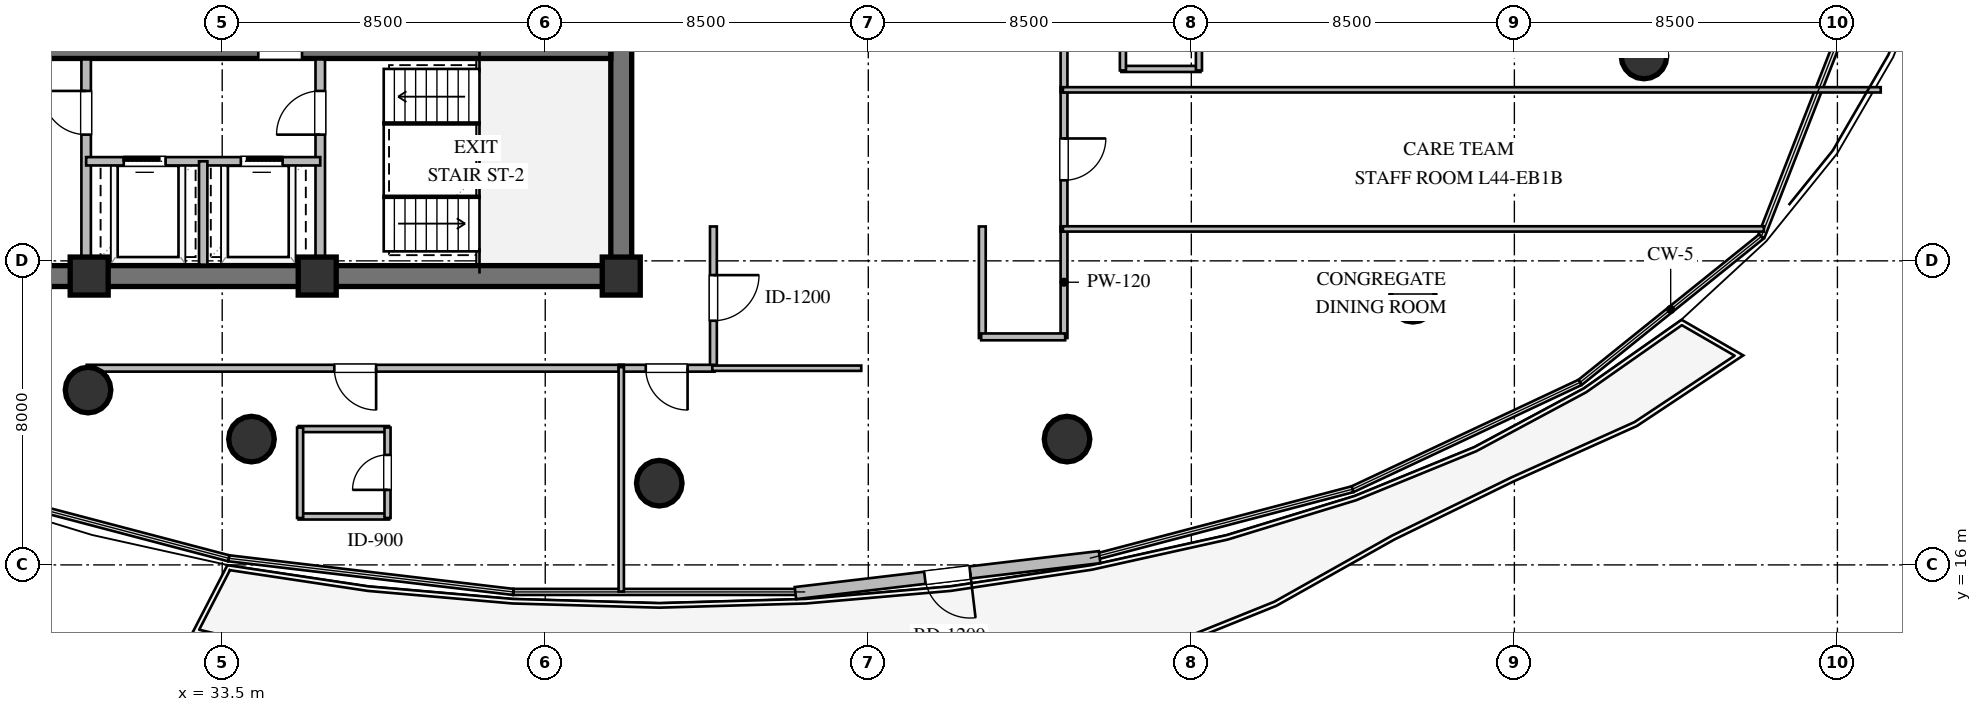
"""IFC4 building model, lengths in metres.
Left out: names, types, materials, properties, quantities, classifications, styles, units other than length and angle.
Written with IfcOpenShell. Run it as: python <this file> out.ifc"""

import sys

from ifc_helpers import new_model, si_unit, direction, frame, frame_2d, origin, origin_2d, place, context, subcontext, project, spatial, rectangle, circle, extrude, element, fill, save


model = new_model("IFC4")
c1 = context("Model", 3, precision=1e-05, world=origin(), true_north=direction((0.0, 1.0)))
c2 = subcontext(c1, "Body", "Model", "MODEL_VIEW")
j1 = project(units=[si_unit("LENGTHUNIT", "METRE"), si_unit("PLANEANGLEUNIT", "RADIAN")], contexts=[c1])
p1 = place(None, origin())
s1 = spatial("IfcSite", under=j1, at=p1, CompositionType="ELEMENT")
p2 = place(p1, origin())
s2 = spatial("IfcBuilding", under=s1, at=p2, CompositionType="ELEMENT")
p3 = place(p2, frame((0.0, 0.0, 167.4)))
s3 = spatial("IfcBuildingStorey", under=s2, at=p3, CompositionType="ELEMENT", Elevation=167.4)
p4 = place(p3, frame((21.725, 23.6, 0.0), z_axis=(0.0, 0.0, 1.0), x_axis=(1.0, 0.0, 0.0)))
e1 = element("IfcWall", 1, at=p4, inside=s3, PredefinedType="SHEAR", context=c2, shape_type="SweptSolid", body=[
    extrude(rectangle(XDim=22.55, YDim=0.55, at=frame_2d((11.275, 0.0))), origin(), (0.0, 0.0, 1.0), 3.36),
])
p5 = place(p3, frame((44.0, 23.875, 0.0), z_axis=(0.0, 0.0, 1.0), x_axis=(0.0, 1.0, 0.0)))
e2 = element("IfcWall", 2, at=p5, inside=s3, PredefinedType="SHEAR", context=c2, shape_type="SweptSolid", body=[
    extrude(rectangle(XDim=12.25, YDim=0.55, at=frame_2d((6.125, 0.0))), origin(), (0.0, 0.0, 1.0), 3.36),
])
p6 = place(p5, frame((8.725, 0.0, 0.0)))
e3 = element("IfcOpeningElement", 3, at=p6, cuts=e2, PredefinedType="OPENING", context=c2, shape_type="SweptSolid", body=[
    extrude(rectangle(XDim=1.5, YDim=2.15, at=frame_2d((0.75, 1.075))), frame((0.0, 0.285, 0.0), z_axis=(0.0, -1.0, 0.0), x_axis=(1.0, 0.0, 0.0)), (0.0, 0.0, 1.0), 0.57),
])
p7 = place(p3, frame((22.275, 29.6, 0.0), z_axis=(0.0, 0.0, 1.0), x_axis=(1.0, 0.0, 0.0)))
e4 = element("IfcWall", 4, at=p7, inside=s3, PredefinedType="SHEAR", context=c2, shape_type="SweptSolid", body=[
    extrude(rectangle(XDim=21.45, YDim=0.55, at=frame_2d((10.725, 0.0))), origin(), (0.0, 0.0, 1.0), 3.36),
])
p8 = place(p7, frame((12.175, 0.0, 0.0)))
e5 = element("IfcOpeningElement", 5, at=p8, cuts=e4, PredefinedType="OPENING", context=c2, shape_type="SweptSolid", body=[
    extrude(rectangle(XDim=1.15, YDim=2.1, at=frame_2d((0.575, 1.05))), frame((0.0, 0.285, 0.0), z_axis=(0.0, -1.0, 0.0), x_axis=(1.0, 0.0, 0.0)), (0.0, 0.0, 1.0), 0.57),
])
for number, where, z_axis, x_axis in (
    (6, (30.0, 23.6, 0.0), (0.0, 0.0, 1.0), (1.0, 0.0, 0.0)),
    (7, (36.0, 23.6, 0.0), (0.0, 0.0, 1.0), (1.0, 0.0, 0.0)),
    (8, (44.0, 23.6, 0.0), (0.0, 0.0, 1.0), (1.0, 0.0, 0.0)),
):
    element("IfcColumn", number, at=place(p3, frame(where, z_axis=z_axis, x_axis=x_axis)), inside=s3, PredefinedType="COLUMN", context=c2, shape_type="SweptSolid", body=[
        extrude(rectangle(XDim=1.0, YDim=1.0, at=origin_2d()), origin(), (0.0, 0.0, 1.0), 3.6),
    ])
for number, where, z_axis, x_axis in (
    (9, (29.97, 20.6, 0.0), (0.0, 0.0, 1.0), (1.0, 0.0, 0.0)),
    (10, (34.27, 19.31, 0.0), (0.0, 0.0, 1.0), (1.0, 0.0, 0.0)),
    (11, (45.0, 18.15, 0.0), (0.0, 0.0, 1.0), (1.0, 0.0, 0.0)),
    (12, (55.73, 19.31, 0.0), (0.0, 0.0, 1.0), (1.0, 0.0, 0.0)),
    (13, (64.83, 22.99, 0.0), (0.0, 0.0, 1.0), (1.0, 0.0, 0.0)),
    (14, (70.91, 29.39, 0.0), (0.0, 0.0, 1.0), (1.0, 0.0, 0.0)),
):
    element("IfcColumn", number, at=place(p3, frame(where, z_axis=z_axis, x_axis=x_axis)), inside=s3, PredefinedType="COLUMN", context=c2, shape_type="SweptSolid", body=[
        extrude(circle(Radius=0.6, at=origin_2d()), origin(), (0.0, 0.0, 1.0), 3.6),
    ])
p9 = place(p3, frame((56.587, 16.205, 0.0), z_axis=(0.0, 0.0, 1.0), x_axis=(-0.993072847957, -0.117500292131, 0.0)))
e15 = element("IfcWall", 15, at=p9, inside=s3, PredefinedType="STANDARD", context=c2, shape_type="SweptSolid", body=[
    extrude(rectangle(XDim=8.06, YDim=0.32, at=frame_2d((4.03, 0.0))), origin(), (0.0, 0.0, 1.0), 3.36),
])
p10 = place(p9, frame((3.43, 0.0, 0.0)))
e16 = element("IfcOpeningElement", 16, at=p10, cuts=e15, PredefinedType="OPENING", context=c2, shape_type="SweptSolid", body=[
    extrude(rectangle(XDim=1.2, YDim=2.15, at=frame_2d((0.6, 1.075))), frame((0.0, 0.17, 0.0), z_axis=(0.0, -1.0, 0.0), x_axis=(1.0, 0.0, 0.0)), (0.0, 0.0, 1.0), 0.34),
])
p11 = place(p3, frame((29.92, 23.9, 0.0), z_axis=(0.0, 0.0, 1.0), x_axis=(0.0, 1.0, 0.0)))
e17 = element("IfcWall", 17, at=p11, inside=s3, PredefinedType="SOLIDWALL", context=c2, shape_type="SweptSolid", body=[
    extrude(rectangle(XDim=5.4, YDim=0.25, at=frame_2d((2.7, 0.0))), origin(), (0.0, 0.0, 1.0), 2.806),
])
p12 = place(p11, frame((3.421, 0.0, 0.0)))
e18 = element("IfcOpeningElement", 18, at=p12, cuts=e17, PredefinedType="OPENING", context=c2, shape_type="SweptSolid", body=[
    extrude(rectangle(XDim=1.15, YDim=2.1, at=frame_2d((0.575, 1.05))), frame((0.0, 0.135, 0.0), z_axis=(0.0, -1.0, 0.0), x_axis=(1.0, 0.0, 0.0)), (0.0, 0.0, 1.0), 0.27),
])
p13 = place(p3, frame((36.08, 23.9, 0.0), z_axis=(0.0, 0.0, 1.0), x_axis=(0.0, 1.0, 0.0)))
e19 = element("IfcWall", 19, at=p13, inside=s3, PredefinedType="SOLIDWALL", context=c2, shape_type="SweptSolid", body=[
    extrude(rectangle(XDim=5.4, YDim=0.25, at=frame_2d((2.7, 0.0))), origin(), (0.0, 0.0, 1.0), 3.36),
])
p14 = place(p13, frame((3.421, 0.0, 0.0)))
e20 = element("IfcOpeningElement", 20, at=p14, cuts=e19, PredefinedType="OPENING", context=c2, shape_type="SweptSolid", body=[
    extrude(rectangle(XDim=1.15, YDim=2.1, at=frame_2d((0.575, 1.05))), frame((0.0, 0.135, 0.0), z_axis=(0.0, -1.0, 0.0), x_axis=(1.0, 0.0, 0.0)), (0.0, 0.0, 1.0), 0.27),
])
p15 = place(p3, frame((29.92, 26.62, 0.0), z_axis=(0.0, 0.0, 1.0), x_axis=(1.0, 0.0, 0.0)))
e21 = element("IfcWall", 21, at=p15, inside=s3, PredefinedType="SOLIDWALL", context=c2, shape_type="SweptSolid", body=[
    extrude(rectangle(XDim=6.16, YDim=0.22, at=frame_2d((3.08, 0.0))), origin(), (0.0, 0.0, 1.0), 3.36),
])
p16 = place(p15, frame((0.99, 0.0, 0.0)))
e22 = element("IfcOpeningElement", 22, at=p16, cuts=e21, PredefinedType="OPENING", context=c2, shape_type="SweptSolid", body=[
    extrude(rectangle(XDim=1.1, YDim=2.1, at=frame_2d((0.55, 1.05))), frame((0.0, 0.12, 0.0), z_axis=(0.0, -1.0, 0.0), x_axis=(1.0, 0.0, 0.0)), (0.0, 0.0, 1.0), 0.24),
])
p17 = place(p15, frame((4.07, 0.0, 0.0)))
e23 = element("IfcOpeningElement", 23, at=p17, cuts=e21, PredefinedType="OPENING", context=c2, shape_type="SweptSolid", body=[
    extrude(rectangle(XDim=1.1, YDim=2.1, at=frame_2d((0.55, 1.05))), frame((0.0, 0.12, 0.0), z_axis=(0.0, -1.0, 0.0), x_axis=(1.0, 0.0, 0.0)), (0.0, 0.0, 1.0), 0.24),
])
p18 = place(p3, frame((33.0, 23.9, 0.0), z_axis=(0.0, 0.0, 1.0), x_axis=(0.0, 1.0, 0.0)))
e24 = element("IfcWall", 24, at=p18, inside=s3, PredefinedType="SOLIDWALL", context=c2, shape_type="SweptSolid", body=[
    extrude(rectangle(XDim=2.72, YDim=0.22, at=frame_2d((1.36, 0.0))), origin(), (0.0, 0.0, 1.0), 3.36),
])
for number, where, z_axis, x_axis in (
    (25, (57.16, 29.05, 0.0), (0.0, 0.0, 1.0), (1.0, 0.0, 0.0)),
    (26, (57.2, 29.01, 0.0), (0.0, 0.0, 1.0), (0.0, 1.0, 0.0)),
):
    element("IfcWall", number, at=place(p3, frame(where, z_axis=z_axis, x_axis=x_axis)), inside=s3, PredefinedType="PLUMBINGWALL", context=c2, shape_type="SweptSolid", body=[
        extrude(rectangle(XDim=2.08, YDim=0.16, at=frame_2d((1.04, 0.0))), origin(), (0.0, 0.0, 1.0), 3.36),
    ])
p19 = place(p3, frame((59.2, 29.01, 0.0), z_axis=(0.0, 0.0, 1.0), x_axis=(0.0, 1.0, 0.0)))
e27 = element("IfcWall", 27, at=p19, inside=s3, PredefinedType="PLUMBINGWALL", context=c2, shape_type="SweptSolid", body=[
    extrude(rectangle(XDim=2.08, YDim=0.16, at=frame_2d((1.04, 0.0))), origin(), (0.0, 0.0, 1.0), 2.996),
])
p20 = place(p19, frame((0.59, 0.0, 0.0)))
e28 = element("IfcOpeningElement", 28, at=p20, cuts=e27, PredefinedType="OPENING", context=c2, shape_type="SweptSolid", body=[
    extrude(rectangle(XDim=0.92, YDim=2.1, at=frame_2d((0.46, 1.05))), frame((0.0, 0.09, 0.0), z_axis=(0.0, -1.0, 0.0), x_axis=(1.0, 0.0, 0.0)), (0.0, 0.0, 1.0), 0.18),
])
p21 = place(p3, frame((35.51, 17.274, 0.0), z_axis=(0.0, 0.0, 1.0), x_axis=(1.0, 0.0, 0.0)))
e29 = element("IfcWall", 29, at=p21, inside=s3, PredefinedType="PLUMBINGWALL", context=c2, shape_type="SweptSolid", body=[
    extrude(rectangle(XDim=2.38, YDim=0.16, at=frame_2d((1.19, 0.0))), origin(), (0.0, 0.0, 1.0), 3.36),
])
p22 = place(p3, frame((35.51, 19.574, 0.0), z_axis=(0.0, 0.0, 1.0), x_axis=(1.0, 0.0, 0.0)))
e30 = element("IfcWall", 30, at=p22, inside=s3, PredefinedType="PLUMBINGWALL", context=c2, shape_type="SweptSolid", body=[
    extrude(rectangle(XDim=2.38, YDim=0.16, at=frame_2d((1.19, 0.0))), origin(), (0.0, 0.0, 1.0), 2.657),
])
p23 = place(p3, frame((35.55, 17.234, 0.0), z_axis=(0.0, 0.0, 1.0), x_axis=(0.0, 1.0, 0.0)))
e31 = element("IfcWall", 31, at=p23, inside=s3, PredefinedType="PLUMBINGWALL", context=c2, shape_type="SweptSolid", body=[
    extrude(rectangle(XDim=2.38, YDim=0.16, at=frame_2d((1.19, 0.0))), origin(), (0.0, 0.0, 1.0), 3.36),
])
p24 = place(p3, frame((37.85, 17.234, 0.0), z_axis=(0.0, 0.0, 1.0), x_axis=(0.0, 1.0, 0.0)))
e32 = element("IfcWall", 32, at=p24, inside=s3, PredefinedType="PLUMBINGWALL", context=c2, shape_type="SweptSolid", body=[
    extrude(rectangle(XDim=2.38, YDim=0.16, at=frame_2d((1.19, 0.0))), origin(), (0.0, 0.0, 1.0), 3.36),
])
p25 = place(p24, frame((0.74, 0.0, 0.0)))
e33 = element("IfcOpeningElement", 33, at=p25, cuts=e32, PredefinedType="OPENING", context=c2, shape_type="SweptSolid", body=[
    extrude(rectangle(XDim=0.92, YDim=2.1, at=frame_2d((0.46, 1.05))), frame((0.0, 0.09, 0.0), z_axis=(0.0, -1.0, 0.0), x_axis=(1.0, 0.0, 0.0)), (0.0, 0.0, 1.0), 0.18),
])
p26 = place(p3, frame((46.425, 24.905, 0.0), z_axis=(0.0, 0.0, 1.0), x_axis=(0.0, -1.0, 0.0)))
e34 = element("IfcWall", 34, at=p26, inside=s3, PredefinedType="PARTITIONING", context=c2, shape_type="SweptSolid", body=[
    extrude(rectangle(XDim=3.76, YDim=0.18, at=frame_2d((1.88, 0.0))), origin(), (0.0, 0.0, 1.0), 3.36),
])
p27 = place(p26, frame((1.28, 0.0, 0.0)))
e35 = element("IfcOpeningElement", 35, at=p27, cuts=e34, PredefinedType="OPENING", context=c2, shape_type="SweptSolid", body=[
    extrude(rectangle(XDim=1.2, YDim=2.15, at=frame_2d((0.6, 1.075))), frame((0.0, 0.1, 0.0), z_axis=(0.0, -1.0, 0.0), x_axis=(1.0, 0.0, 0.0)), (0.0, 0.0, 1.0), 0.2),
])
for number, where, z_axis, x_axis in (
    (36, (55.65, 24.905, 0.0), (0.0, 0.0, 1.0), (0.0, -1.0, 0.0)),
    (37, (53.5, 21.97, 0.0), (0.0, 0.0, 1.0), (0.0, 1.0, 0.0)),
):
    element("IfcWall", number, at=place(p3, frame(where, z_axis=z_axis, x_axis=x_axis)), inside=s3, PredefinedType="PARTITIONING", context=c2, shape_type="SweptSolid", body=[
        extrude(rectangle(XDim=2.935, YDim=0.18, at=frame_2d((1.468, 0.0))), origin(), (0.0, 0.0, 1.0), 3.36),
    ])
p28 = place(p3, frame((55.68, 22.0, 0.0), z_axis=(0.0, 0.0, 1.0), x_axis=(-1.0, 0.0, 0.0)))
e38 = element("IfcWall", 38, at=p28, inside=s3, PredefinedType="PARTITIONING", context=c2, shape_type="SweptSolid", body=[
    extrude(rectangle(XDim=2.21, YDim=0.18, at=frame_2d((1.105, 0.0))), origin(), (0.0, 0.0, 1.0), 3.36),
])
p29 = place(p3, frame((55.65, 28.565, 0.0), z_axis=(0.0, 0.0, 1.0), x_axis=(0.0, -1.0, 0.0)))
e39 = element("IfcWall", 39, at=p29, inside=s3, PredefinedType="PARTITIONING", context=c2, shape_type="SweptSolid", body=[
    extrude(rectangle(XDim=3.79, YDim=0.18, at=frame_2d((1.895, 0.0))), origin(), (0.0, 0.0, 1.0), 3.36),
])
p30 = place(p29, frame((1.345, 0.0, 0.0)))
e40 = element("IfcOpeningElement", 40, at=p30, cuts=e39, PredefinedType="OPENING", context=c2, shape_type="SweptSolid", body=[
    extrude(rectangle(XDim=1.1, YDim=2.1, at=frame_2d((0.55, 1.05))), frame((0.0, 0.1, 0.0), z_axis=(0.0, -1.0, 0.0), x_axis=(1.0, 0.0, 0.0)), (0.0, 0.0, 1.0), 0.2),
])
p31 = place(p3, frame((55.65, 31.815, 0.0), z_axis=(0.0, 0.0, 1.0), x_axis=(0.0, -1.0, 0.0)))
e41 = element("IfcWall", 41, at=p31, inside=s3, PredefinedType="PARTITIONING", context=c2, shape_type="SweptSolid", body=[
    extrude(rectangle(XDim=3.38, YDim=0.18, at=frame_2d((1.69, 0.0))), origin(), (0.0, 0.0, 1.0), 3.36),
])
p32 = place(p31, frame((1.14, 0.0, 0.0)))
e42 = element("IfcOpeningElement", 42, at=p32, cuts=e41, PredefinedType="OPENING", context=c2, shape_type="SweptSolid", body=[
    extrude(rectangle(XDim=1.1, YDim=2.1, at=frame_2d((0.55, 1.05))), frame((0.0, 0.1, 0.0), z_axis=(0.0, -1.0, 0.0), x_axis=(1.0, 0.0, 0.0)), (0.0, 0.0, 1.0), 0.2),
])
p33 = place(p3, frame((44.065, 21.175, 0.0), z_axis=(0.0, 0.0, 1.0), x_axis=(-1.0, 0.0, 0.0)))
e43 = element("IfcWall", 43, at=p33, inside=s3, PredefinedType="PARTITIONING", context=c2, shape_type="SweptSolid", body=[
    extrude(rectangle(XDim=14.13, YDim=0.18, at=frame_2d((7.065, 0.0))), origin(), (0.0, 0.0, 1.0), 2.657),
])
p34 = place(p33, frame((6.515, 0.0, 0.0)))
e44 = element("IfcOpeningElement", 44, at=p34, cuts=e43, PredefinedType="OPENING", context=c2, shape_type="SweptSolid", body=[
    extrude(rectangle(XDim=1.1, YDim=2.1, at=frame_2d((0.55, 1.05))), frame((0.0, 0.1, 0.0), z_axis=(0.0, -1.0, 0.0), x_axis=(1.0, 0.0, 0.0)), (0.0, 0.0, 1.0), 0.2),
])
p35 = place(p3, frame((46.455, 21.175, 0.0), z_axis=(0.0, 0.0, 1.0), x_axis=(-1.0, 0.0, 0.0)))
e45 = element("IfcWall", 45, at=p35, inside=s3, PredefinedType="PARTITIONING", context=c2, shape_type="SweptSolid", body=[
    extrude(rectangle(XDim=2.52, YDim=0.18, at=frame_2d((1.26, 0.0))), origin(), (0.0, 0.0, 1.0), 2.996),
])
p36 = place(p35, frame((0.71, 0.0, 0.0)))
e46 = element("IfcOpeningElement", 46, at=p36, cuts=e45, PredefinedType="OPENING", context=c2, shape_type="SweptSolid", body=[
    extrude(rectangle(XDim=1.1, YDim=2.1, at=frame_2d((0.55, 1.05))), frame((0.0, 0.1, 0.0), z_axis=(0.0, -1.0, 0.0), x_axis=(1.0, 0.0, 0.0)), (0.0, 0.0, 1.0), 0.2),
])
p37 = place(p3, frame((55.62, 24.84, 0.0), z_axis=(0.0, 0.0, 1.0), x_axis=(1.0, 0.0, 0.0)))
e47 = element("IfcWall", 47, at=p37, inside=s3, PredefinedType="PARTITIONING", context=c2, shape_type="SweptSolid", body=[
    extrude(rectangle(XDim=18.445, YDim=0.14, at=frame_2d((9.222, 0.0))), origin(), (0.0, 0.0, 1.0), 3.36),
])
p38 = place(p3, frame((50.315, 21.175, 0.0), z_axis=(0.0, 0.0, 1.0), x_axis=(-1.0, 0.0, 0.0)))
e48 = element("IfcWall", 48, at=p38, inside=s3, PredefinedType="PARTITIONING", context=c2, shape_type="SweptSolid", body=[
    extrude(rectangle(XDim=3.92, YDim=0.14, at=frame_2d((1.96, 0.0))), origin(), (0.0, 0.0, 1.0), 2.996),
])
p39 = place(p3, frame((55.62, 28.5, 0.0), z_axis=(0.0, 0.0, 1.0), x_axis=(1.0, 0.0, 0.0)))
e49 = element("IfcWall", 49, at=p39, inside=s3, PredefinedType="PARTITIONING", context=c2, shape_type="SweptSolid", body=[
    extrude(rectangle(XDim=21.52, YDim=0.14, at=frame_2d((10.76, 0.0))), origin(), (0.0, 0.0, 1.0), 2.806),
])
p40 = place(p3, frame((44.0, 21.205, 0.0), z_axis=(0.0, 0.0, 1.0), x_axis=(0.0, -1.0, 0.0)))
e50 = element("IfcWall", 50, at=p40, inside=s3, PredefinedType="PARTITIONING", context=c2, shape_type="SweptSolid", body=[
    extrude(rectangle(XDim=5.906, YDim=0.14, at=frame_2d((2.953, 0.0))), origin(), (0.0, 0.0, 1.0), 2.806),
])
p41 = place(p10, origin())
e51 = element("IfcDoor", 51, at=p41, inside=s3, OperationType="SINGLE_SWING_LEFT", PredefinedType="DOOR", context=c2, shape_type="SweptSolid", body=[
    extrude(rectangle(XDim=1.2, YDim=2.15, at=frame_2d((0.6, 1.075))), frame((0.0, 0.025, 0.0), z_axis=(0.0, -1.0, 0.0), x_axis=(1.0, 0.0, 0.0)), (0.0, 0.0, 1.0), 0.05),
])
fill(e16, e51)
p42 = place(p12, origin())
e52 = element("IfcDoor", 52, at=p42, inside=s3, OperationType="SINGLE_SWING_RIGHT", PredefinedType="DOOR", context=c2, shape_type="SweptSolid", body=[
    extrude(rectangle(XDim=1.15, YDim=2.1, at=frame_2d((0.575, 1.05))), frame((0.0, 0.025, 0.0), z_axis=(0.0, -1.0, 0.0), x_axis=(1.0, 0.0, 0.0)), (0.0, 0.0, 1.0), 0.05),
])
fill(e18, e52)
p43 = place(p14, origin())
e53 = element("IfcDoor", 53, at=p43, inside=s3, OperationType="SINGLE_SWING_LEFT", PredefinedType="DOOR", context=c2, shape_type="SweptSolid", body=[
    extrude(rectangle(XDim=1.15, YDim=2.1, at=frame_2d((0.575, 1.05))), frame((0.0, 0.025, 0.0), z_axis=(0.0, -1.0, 0.0), x_axis=(1.0, 0.0, 0.0)), (0.0, 0.0, 1.0), 0.05),
])
fill(e20, e53)
p44 = place(p16, origin())
e54 = element("IfcDoor", 54, at=p44, inside=s3, OperationType="SLIDING_TO_LEFT", PredefinedType="DOOR", context=c2, shape_type="SweptSolid", body=[
    extrude(rectangle(XDim=1.1, YDim=2.1, at=frame_2d((0.55, 1.05))), frame((0.0, 0.025, 0.0), z_axis=(0.0, -1.0, 0.0), x_axis=(1.0, 0.0, 0.0)), (0.0, 0.0, 1.0), 0.05),
])
fill(e22, e54)
p45 = place(p17, origin())
e55 = element("IfcDoor", 55, at=p45, inside=s3, OperationType="SLIDING_TO_RIGHT", PredefinedType="DOOR", context=c2, shape_type="SweptSolid", body=[
    extrude(rectangle(XDim=1.1, YDim=2.1, at=frame_2d((0.55, 1.05))), frame((0.0, 0.025, 0.0), z_axis=(0.0, -1.0, 0.0), x_axis=(1.0, 0.0, 0.0)), (0.0, 0.0, 1.0), 0.05),
])
fill(e23, e55)
p46 = place(p25, origin())
e56 = element("IfcDoor", 56, at=p46, inside=s3, OperationType="SINGLE_SWING_LEFT", PredefinedType="DOOR", context=c2, shape_type="SweptSolid", body=[
    extrude(rectangle(XDim=0.92, YDim=2.1, at=frame_2d((0.46, 1.05))), frame((0.0, 0.025, 0.0), z_axis=(0.0, -1.0, 0.0), x_axis=(1.0, 0.0, 0.0)), (0.0, 0.0, 1.0), 0.05),
])
fill(e33, e56)
p47 = place(p27, origin())
e57 = element("IfcDoor", 57, at=p47, inside=s3, OperationType="SINGLE_SWING_LEFT", PredefinedType="DOOR", context=c2, shape_type="SweptSolid", body=[
    extrude(rectangle(XDim=1.2, YDim=2.15, at=frame_2d((0.6, 1.075))), frame((0.0, 0.025, 0.0), z_axis=(0.0, -1.0, 0.0), x_axis=(1.0, 0.0, 0.0)), (0.0, 0.0, 1.0), 0.05),
])
fill(e35, e57)
p48 = place(p30, origin())
e58 = element("IfcDoor", 58, at=p48, inside=s3, OperationType="SINGLE_SWING_LEFT", PredefinedType="DOOR", context=c2, shape_type="SweptSolid", body=[
    extrude(rectangle(XDim=1.1, YDim=2.1, at=frame_2d((0.55, 1.05))), frame((0.0, 0.025, 0.0), z_axis=(0.0, -1.0, 0.0), x_axis=(1.0, 0.0, 0.0)), (0.0, 0.0, 1.0), 0.05),
])
fill(e40, e58)
p49 = place(p34, origin())
e59 = element("IfcDoor", 59, at=p49, inside=s3, OperationType="SINGLE_SWING_LEFT", PredefinedType="DOOR", context=c2, shape_type="SweptSolid", body=[
    extrude(rectangle(XDim=1.1, YDim=2.1, at=frame_2d((0.55, 1.05))), frame((0.0, 0.025, 0.0), z_axis=(0.0, -1.0, 0.0), x_axis=(1.0, 0.0, 0.0)), (0.0, 0.0, 1.0), 0.05),
])
fill(e44, e59)
p50 = place(p36, origin())
e60 = element("IfcDoor", 60, at=p50, inside=s3, OperationType="SINGLE_SWING_LEFT", PredefinedType="DOOR", context=c2, shape_type="SweptSolid", body=[
    extrude(rectangle(XDim=1.1, YDim=2.1, at=frame_2d((0.55, 1.05))), frame((0.0, 0.025, 0.0), z_axis=(0.0, -1.0, 0.0), x_axis=(1.0, 0.0, 0.0)), (0.0, 0.0, 1.0), 0.05),
])
fill(e46, e60)
save(model, sys.argv[1])
